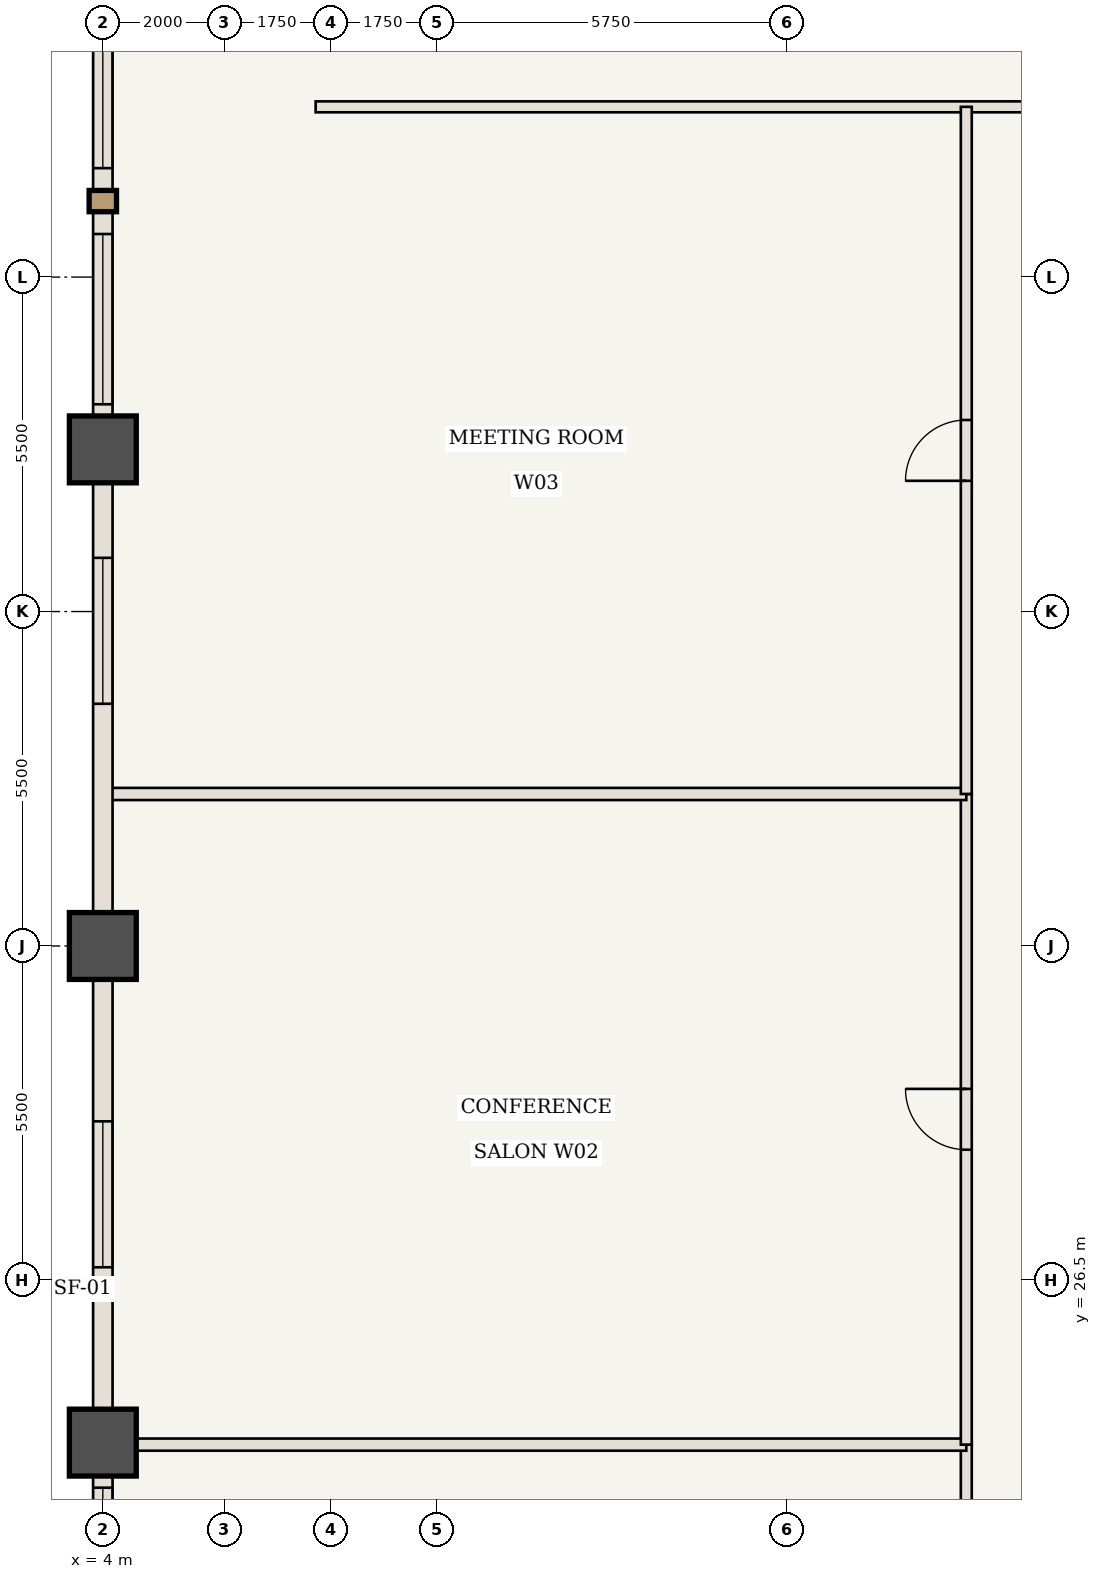
"""IFC4 building model, lengths in metres.
Left out: names, types, materials, properties, quantities, classifications, styles, units other than length and angle.
Written with IfcOpenShell. Run it as: python <this file> out.ifc"""

import sys

from ifc_helpers import new_model, si_unit, direction, frame, frame_2d, origin, origin_2d, place, context, subcontext, project, spatial, rectangle, extrude, element, fill, save


model = new_model("IFC4")
c1 = context("Model", 3, precision=1e-05, world=origin(), true_north=direction((0.0, 1.0)))
c2 = subcontext(c1, "Body", "Model", "MODEL_VIEW")
j1 = project(units=[si_unit("LENGTHUNIT", "METRE"), si_unit("PLANEANGLEUNIT", "RADIAN")], contexts=[c1])
p1 = place(None, origin())
s1 = spatial("IfcSite", under=j1, at=p1, CompositionType="ELEMENT")
p2 = place(p1, origin())
s2 = spatial("IfcBuilding", under=s1, at=p2, CompositionType="ELEMENT")
p3 = place(p2, frame((0.0, 0.0, 92.75)))
s3 = spatial("IfcBuildingStorey", under=s2, at=p3, CompositionType="ELEMENT", Elevation=92.75)
for number, where, z_axis, x_axis in (
    (1, (4.0, 23.833, 0.0), (0.0, 0.0, 1.0), (1.0, 0.0, 0.0)),
    (2, (4.0, 32.0, 0.0), (0.0, 0.0, 1.0), (1.0, 0.0, 0.0)),
    (3, (4.0, 40.167, 0.0), (0.0, 0.0, 1.0), (1.0, 0.0, 0.0)),
):
    element("IfcColumn", number, at=place(p3, frame(where, z_axis=z_axis, x_axis=x_axis)), inside=s3, PredefinedType="COLUMN", context=c2, shape_type="SweptSolid", body=[
        extrude(rectangle(XDim=1.1, YDim=1.1, at=origin_2d()), origin(), (0.0, 0.0, 1.0), 3.5),
    ])
p4 = place(p3, frame((7.5, 45.8, 0.0), z_axis=(0.0, 0.0, 1.0), x_axis=(1.0, 0.0, 0.0)))
e4 = element("IfcWall", 4, at=p4, inside=s3, PredefinedType="STANDARD", context=c2, shape_type="SweptSolid", body=[
    extrude(rectangle(XDim=14.3, YDim=0.18, at=frame_2d((7.15, 0.0))), origin(), (0.0, 0.0, 1.0), 3.28),
])
p5 = place(p4, frame((12.025, 0.0, 0.0)))
e5 = element("IfcOpeningElement", 5, at=p5, cuts=e4, PredefinedType="OPENING", context=c2, shape_type="SweptSolid", body=[
    extrude(rectangle(XDim=1.0, YDim=2.15, at=frame_2d((0.5, 1.075))), frame((0.0, 0.1, 0.0), z_axis=(0.0, -1.0, 0.0), x_axis=(1.0, 0.0, 0.0)), (0.0, 0.0, 1.0), 0.2),
])
p6 = place(p3, frame((18.2, 18.2, 0.0), z_axis=(0.0, 0.0, 1.0), x_axis=(0.0, 1.0, 0.0)))
e6 = element("IfcWall", 6, at=p6, inside=s3, PredefinedType="STANDARD", context=c2, shape_type="SweptSolid", body=[
    extrude(rectangle(XDim=5.6, YDim=0.18, at=frame_2d((2.8, 0.0))), origin(), (0.0, 0.0, 1.0), 3.28),
])
p7 = place(p6, frame((0.85, 0.0, 0.0)))
e7 = element("IfcOpeningElement", 7, at=p7, cuts=e6, PredefinedType="OPENING", context=c2, shape_type="SweptSolid", body=[
    extrude(rectangle(XDim=1.0, YDim=2.15, at=frame_2d((0.5, 1.075))), frame((0.0, 0.1, 0.0), z_axis=(0.0, -1.0, 0.0), x_axis=(1.0, 0.0, 0.0)), (0.0, 0.0, 1.0), 0.2),
])
p8 = place(p3, frame((4.06, 23.8, 0.0), z_axis=(0.0, 0.0, 1.0), x_axis=(1.0, 0.0, 0.0)))
e8 = element("IfcWall", 8, at=p8, inside=s3, PredefinedType="STANDARD", context=c2, shape_type="SweptSolid", body=[
    extrude(rectangle(XDim=14.14, YDim=0.2, at=frame_2d((7.07, 0.0))), origin(), (0.0, 0.0, 1.0), 3.28),
])
p9 = place(p3, frame((18.2, 23.8, 0.0), z_axis=(0.0, 0.0, 1.0), x_axis=(0.0, 1.0, 0.0)))
e9 = element("IfcWall", 9, at=p9, inside=s3, PredefinedType="STANDARD", context=c2, shape_type="SweptSolid", body=[
    extrude(rectangle(XDim=10.7, YDim=0.18, at=frame_2d((5.35, 0.0))), origin(), (0.0, 0.0, 1.0), 3.28),
])
p10 = place(p9, frame((4.85, 0.0, 0.0)))
e10 = element("IfcOpeningElement", 10, at=p10, cuts=e9, PredefinedType="OPENING", context=c2, shape_type="SweptSolid", body=[
    extrude(rectangle(XDim=1.0, YDim=2.15, at=frame_2d((0.5, 1.075))), frame((0.0, 0.1, 0.0), z_axis=(0.0, -1.0, 0.0), x_axis=(1.0, 0.0, 0.0)), (0.0, 0.0, 1.0), 0.2),
])
p11 = place(p3, frame((4.06, 34.5, 0.0), z_axis=(0.0, 0.0, 1.0), x_axis=(1.0, 0.0, 0.0)))
e11 = element("IfcWall", 11, at=p11, inside=s3, PredefinedType="STANDARD", context=c2, shape_type="SweptSolid", body=[
    extrude(rectangle(XDim=14.14, YDim=0.2, at=frame_2d((7.07, 0.0))), origin(), (0.0, 0.0, 1.0), 3.28),
])
p12 = place(p3, frame((18.2, 34.5, 0.0), z_axis=(0.0, 0.0, 1.0), x_axis=(0.0, 1.0, 0.0)))
e12 = element("IfcWall", 12, at=p12, inside=s3, PredefinedType="STANDARD", context=c2, shape_type="SweptSolid", body=[
    extrude(rectangle(XDim=11.3, YDim=0.18, at=frame_2d((5.65, 0.0))), origin(), (0.0, 0.0, 1.0), 3.28),
])
p13 = place(p12, frame((5.15, 0.0, 0.0)))
e13 = element("IfcOpeningElement", 13, at=p13, cuts=e12, PredefinedType="OPENING", context=c2, shape_type="SweptSolid", body=[
    extrude(rectangle(XDim=1.0, YDim=2.15, at=frame_2d((0.5, 1.075))), frame((0.0, 0.1, 0.0), z_axis=(0.0, -1.0, 0.0), x_axis=(1.0, 0.0, 0.0)), (0.0, 0.0, 1.0), 0.2),
])
p14 = place(p3, frame((4.0, 15.667, 0.0), z_axis=(0.0, 0.0, 1.0), x_axis=(0.0, 1.0, 0.0)))
e14 = element("IfcWall", 14, at=p14, inside=s3, PredefinedType="USERDEFINED", context=c2, shape_type="SweptSolid", body=[
    extrude(rectangle(XDim=8.167, YDim=0.32, at=frame_2d((4.083, 0.0))), origin(), (0.0, 0.0, 1.0), 2.48),
])
p15 = place(p14, frame((0.742, 0.0, 0.85)))
e15 = element("IfcOpeningElement", 15, at=p15, cuts=e14, PredefinedType="OPENING", context=c2, shape_type="SweptSolid", body=[
    extrude(rectangle(XDim=2.8, YDim=1.43, at=frame_2d((1.4, 0.715))), frame((0.0, 0.17, 0.0), z_axis=(0.0, -1.0, 0.0), x_axis=(1.0, 0.0, 0.0)), (0.0, 0.0, 1.0), 0.34),
])
p16 = place(p14, frame((4.625, 0.0, 0.85)))
e16 = element("IfcOpeningElement", 16, at=p16, cuts=e14, PredefinedType="OPENING", context=c2, shape_type="SweptSolid", body=[
    extrude(rectangle(XDim=2.8, YDim=1.43, at=frame_2d((1.4, 0.715))), frame((0.0, 0.17, 0.0), z_axis=(0.0, -1.0, 0.0), x_axis=(1.0, 0.0, 0.0)), (0.0, 0.0, 1.0), 0.34),
])
p17 = place(p3, frame((4.0, 23.833, 0.0), z_axis=(0.0, 0.0, 1.0), x_axis=(0.0, 1.0, 0.0)))
e17 = element("IfcWall", 17, at=p17, inside=s3, PredefinedType="USERDEFINED", context=c2, shape_type="SweptSolid", body=[
    extrude(rectangle(XDim=8.167, YDim=0.32, at=frame_2d((4.083, 0.0))), origin(), (0.0, 0.0, 1.0), 2.48),
])
p18 = place(p17, frame((2.883, 0.0, 0.85)))
e18 = element("IfcOpeningElement", 18, at=p18, cuts=e17, PredefinedType="OPENING", context=c2, shape_type="SweptSolid", body=[
    extrude(rectangle(XDim=2.4, YDim=1.43, at=frame_2d((1.2, 0.715))), frame((0.0, 0.17, 0.0), z_axis=(0.0, -1.0, 0.0), x_axis=(1.0, 0.0, 0.0)), (0.0, 0.0, 1.0), 0.34),
])
p19 = place(p3, frame((4.0, 32.0, 0.0), z_axis=(0.0, 0.0, 1.0), x_axis=(0.0, 1.0, 0.0)))
e19 = element("IfcWall", 19, at=p19, inside=s3, PredefinedType="USERDEFINED", context=c2, shape_type="SweptSolid", body=[
    extrude(rectangle(XDim=8.167, YDim=0.32, at=frame_2d((4.083, 0.0))), origin(), (0.0, 0.0, 1.0), 2.48),
])
p20 = place(p19, frame((3.983, 0.0, 0.85)))
e20 = element("IfcOpeningElement", 20, at=p20, cuts=e19, PredefinedType="OPENING", context=c2, shape_type="SweptSolid", body=[
    extrude(rectangle(XDim=2.4, YDim=1.43, at=frame_2d((1.2, 0.715))), frame((0.0, 0.17, 0.0), z_axis=(0.0, -1.0, 0.0), x_axis=(1.0, 0.0, 0.0)), (0.0, 0.0, 1.0), 0.34),
])
p21 = place(p3, frame((4.0, 40.167, 0.0), z_axis=(0.0, 0.0, 1.0), x_axis=(0.0, 1.0, 0.0)))
e21 = element("IfcWall", 21, at=p21, inside=s3, PredefinedType="USERDEFINED", context=c2, shape_type="SweptSolid", body=[
    extrude(rectangle(XDim=8.167, YDim=0.32, at=frame_2d((4.083, 0.0))), origin(), (0.0, 0.0, 1.0), 2.48),
])
p22 = place(p21, frame((0.742, 0.0, 0.85)))
e22 = element("IfcOpeningElement", 22, at=p22, cuts=e21, PredefinedType="OPENING", context=c2, shape_type="SweptSolid", body=[
    extrude(rectangle(XDim=2.8, YDim=1.43, at=frame_2d((1.4, 0.715))), frame((0.0, 0.17, 0.0), z_axis=(0.0, -1.0, 0.0), x_axis=(1.0, 0.0, 0.0)), (0.0, 0.0, 1.0), 0.34),
])
p23 = place(p21, frame((4.625, 0.0, 0.85)))
e23 = element("IfcOpeningElement", 23, at=p23, cuts=e21, PredefinedType="OPENING", context=c2, shape_type="SweptSolid", body=[
    extrude(rectangle(XDim=2.8, YDim=1.43, at=frame_2d((1.4, 0.715))), frame((0.0, 0.17, 0.0), z_axis=(0.0, -1.0, 0.0), x_axis=(1.0, 0.0, 0.0)), (0.0, 0.0, 1.0), 0.34),
])
p24 = place(p10, origin())
e24 = element("IfcDoor", 24, at=p24, inside=s3, OperationType="SINGLE_SWING_RIGHT", PredefinedType="DOOR", context=c2, shape_type="SweptSolid", body=[
    extrude(rectangle(XDim=1.0, YDim=2.15, at=frame_2d((0.5, 1.075))), frame((0.0, 0.025, 0.0), z_axis=(0.0, -1.0, 0.0), x_axis=(1.0, 0.0, 0.0)), (0.0, 0.0, 1.0), 0.05),
])
fill(e10, e24)
p25 = place(p13, origin())
e25 = element("IfcDoor", 25, at=p25, inside=s3, OperationType="SINGLE_SWING_LEFT", PredefinedType="DOOR", context=c2, shape_type="SweptSolid", body=[
    extrude(rectangle(XDim=1.0, YDim=2.15, at=frame_2d((0.5, 1.075))), frame((0.0, 0.025, 0.0), z_axis=(0.0, -1.0, 0.0), x_axis=(1.0, 0.0, 0.0)), (0.0, 0.0, 1.0), 0.05),
])
fill(e13, e25)
p26 = place(p16, origin())
e26 = element("IfcWindow", 26, at=p26, inside=s3, PartitioningType="SINGLE_PANEL", PredefinedType="WINDOW", context=c2, shape_type="SweptSolid", body=[
    extrude(rectangle(XDim=2.8, YDim=1.43, at=frame_2d((1.4, 0.715))), frame((0.0, 0.03, 0.0), z_axis=(0.0, -1.0, 0.0), x_axis=(1.0, 0.0, 0.0)), (0.0, 0.0, 1.0), 0.06),
])
fill(e16, e26)
p27 = place(p18, origin())
e27 = element("IfcWindow", 27, at=p27, inside=s3, PartitioningType="SINGLE_PANEL", PredefinedType="WINDOW", context=c2, shape_type="SweptSolid", body=[
    extrude(rectangle(XDim=2.4, YDim=1.43, at=frame_2d((1.2, 0.715))), frame((0.0, 0.03, 0.0), z_axis=(0.0, -1.0, 0.0), x_axis=(1.0, 0.0, 0.0)), (0.0, 0.0, 1.0), 0.06),
])
fill(e18, e27)
p28 = place(p20, origin())
e28 = element("IfcWindow", 28, at=p28, inside=s3, PartitioningType="SINGLE_PANEL", PredefinedType="WINDOW", context=c2, shape_type="SweptSolid", body=[
    extrude(rectangle(XDim=2.4, YDim=1.43, at=frame_2d((1.2, 0.715))), frame((0.0, 0.03, 0.0), z_axis=(0.0, -1.0, 0.0), x_axis=(1.0, 0.0, 0.0)), (0.0, 0.0, 1.0), 0.06),
])
fill(e20, e28)
p29 = place(p22, origin())
e29 = element("IfcWindow", 29, at=p29, inside=s3, PartitioningType="SINGLE_PANEL", PredefinedType="WINDOW", context=c2, shape_type="SweptSolid", body=[
    extrude(rectangle(XDim=2.8, YDim=1.43, at=frame_2d((1.4, 0.715))), frame((0.0, 0.03, 0.0), z_axis=(0.0, -1.0, 0.0), x_axis=(1.0, 0.0, 0.0)), (0.0, 0.0, 1.0), 0.06),
])
fill(e22, e29)
p30 = place(p23, origin())
e30 = element("IfcWindow", 30, at=p30, inside=s3, PartitioningType="SINGLE_PANEL", PredefinedType="WINDOW", context=c2, shape_type="SweptSolid", body=[
    extrude(rectangle(XDim=2.8, YDim=1.43, at=frame_2d((1.4, 0.715))), frame((0.0, 0.03, 0.0), z_axis=(0.0, -1.0, 0.0), x_axis=(1.0, 0.0, 0.0)), (0.0, 0.0, 1.0), 0.06),
])
fill(e23, e30)
save(model, sys.argv[1])
